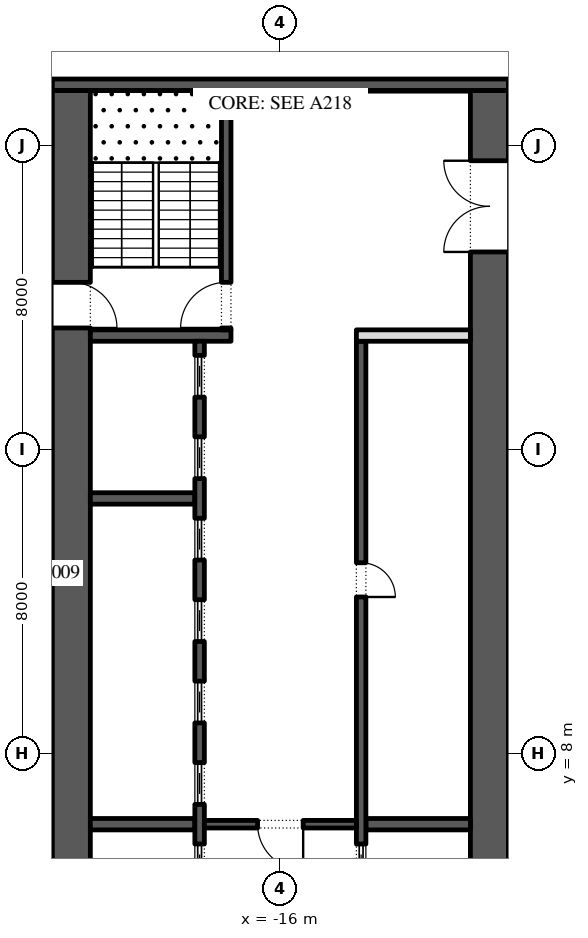
"""IFC4 building model, lengths in metres.
Left out: names, types, materials, properties, quantities, classifications, styles, units other than length and angle.
Written with IfcOpenShell. Run it as: python <this file> out.ifc"""

import sys

from ifc_helpers import new_model, si_unit, direction, frame, frame_2d, origin, place, context, subcontext, project, spatial, rectangle, extrude, element, fill, save


model = new_model("IFC4")
c1 = context("Model", 3, precision=1e-05, world=origin(), true_north=direction((0.0, 1.0)))
c2 = subcontext(c1, "Body", "Model", "MODEL_VIEW")
j1 = project(units=[si_unit("LENGTHUNIT", "METRE"), si_unit("PLANEANGLEUNIT", "RADIAN")], contexts=[c1])
p1 = place(None, origin())
s1 = spatial("IfcSite", under=j1, at=p1, CompositionType="ELEMENT")
p2 = place(p1, origin())
s2 = spatial("IfcBuilding", under=s1, at=p2, CompositionType="ELEMENT")
p3 = place(p2, frame((0.0, 0.0, 73.2)))
s3 = spatial("IfcBuildingStorey", under=s2, at=p3, CompositionType="ELEMENT", Elevation=73.2)
p4 = place(p3, frame((-21.5, -2.45, 0.0), z_axis=(0.0, 0.0, 1.0), x_axis=(0.0, 1.0, 0.0)))
e1 = element("IfcWall", 1, at=p4, inside=s3, PredefinedType="SHEAR", context=c2, shape_type="SweptSolid", body=[
    extrude(rectangle(XDim=27.9, YDim=1.0, at=frame_2d((13.95, 0.0))), origin(), (0.0, 0.0, 1.0), 4.0),
])
p5 = place(p4, frame((5.05, 0.0, 0.0)))
e2 = element("IfcOpeningElement", 2, at=p5, cuts=e1, PredefinedType="OPENING", context=c2, shape_type="SweptSolid", body=[
    extrude(rectangle(XDim=1.2, YDim=2.1, at=frame_2d((0.6, 1.05))), frame((0.0, 0.51, 0.0), z_axis=(0.0, -1.0, 0.0), x_axis=(1.0, 0.0, 0.0)), (0.0, 0.0, 1.0), 1.02),
])
p6 = place(p4, frame((21.65, 0.0, 0.0)))
e3 = element("IfcOpeningElement", 3, at=p6, cuts=e1, PredefinedType="OPENING", context=c2, shape_type="SweptSolid", body=[
    extrude(rectangle(XDim=1.2, YDim=2.1, at=frame_2d((0.6, 1.05))), frame((0.0, 0.51, 0.0), z_axis=(0.0, -1.0, 0.0), x_axis=(1.0, 0.0, 0.0)), (0.0, 0.0, 1.0), 1.02),
])
p7 = place(p3, frame((-10.5, -2.45, 0.0), z_axis=(0.0, 0.0, 1.0), x_axis=(0.0, 1.0, 0.0)))
e4 = element("IfcWall", 4, at=p7, inside=s3, PredefinedType="SHEAR", context=c2, shape_type="SweptSolid", body=[
    extrude(rectangle(XDim=27.9, YDim=1.0, at=frame_2d((13.95, 0.0))), origin(), (0.0, 0.0, 1.0), 4.0),
])
p8 = place(p7, frame((23.65, 0.0, 0.0)))
e5 = element("IfcOpeningElement", 5, at=p8, cuts=e4, PredefinedType="OPENING", context=c2, shape_type="SweptSolid", body=[
    extrude(rectangle(XDim=2.4, YDim=2.1, at=frame_2d((1.2, 1.05))), frame((0.0, 0.51, 0.0), z_axis=(0.0, -1.0, 0.0), x_axis=(1.0, 0.0, 0.0)), (0.0, 0.0, 1.0), 1.02),
])
p9 = place(p7, frame((1.087, 0.0, 0.0)))
e6 = element("IfcOpeningElement", 6, at=p9, cuts=e4, PredefinedType="OPENING", context=c2, shape_type="SweptSolid", body=[
    extrude(rectangle(XDim=0.9, YDim=2.1, at=frame_2d((0.45, 1.05))), frame((0.0, 0.51, 0.0), z_axis=(0.0, -1.0, 0.0), x_axis=(1.0, 0.0, 0.0)), (0.0, 0.0, 1.0), 1.02),
])
p10 = place(p7, frame((4.312, 0.0, 0.0)))
e7 = element("IfcOpeningElement", 7, at=p10, cuts=e4, PredefinedType="OPENING", context=c2, shape_type="SweptSolid", body=[
    extrude(rectangle(XDim=0.9, YDim=2.1, at=frame_2d((0.45, 1.05))), frame((0.0, 0.51, 0.0), z_axis=(0.0, -1.0, 0.0), x_axis=(1.0, 0.0, 0.0)), (0.0, 0.0, 1.0), 1.02),
])
p11 = place(p3, frame((-22.0, 25.6, 0.0), z_axis=(0.0, 0.0, 1.0), x_axis=(1.0, 0.0, 0.0)))
e8 = element("IfcWall", 8, at=p11, inside=s3, PredefinedType="SHEAR", context=c2, shape_type="SweptSolid", body=[
    extrude(rectangle(XDim=12.0, YDim=0.3, at=frame_2d((6.0, 0.0))), origin(), (0.0, 0.0, 1.0), 4.0),
])
p12 = place(p3, frame((-21.0, 19.0, 0.0), z_axis=(0.0, 0.0, 1.0), x_axis=(1.0, 0.0, 0.0)))
e9 = element("IfcWall", 9, at=p12, inside=s3, PredefinedType="SHEAR", context=c2, shape_type="SweptSolid", body=[
    extrude(rectangle(XDim=3.7, YDim=0.3, at=frame_2d((1.85, 0.0))), origin(), (0.0, 0.0, 1.0), 4.0),
])
p13 = place(p3, frame((-17.425, 19.15, 0.0), z_axis=(0.0, 0.0, 1.0), x_axis=(0.0, 1.0, 0.0)))
e10 = element("IfcWall", 10, at=p13, inside=s3, PredefinedType="SHEAR", context=c2, shape_type="SweptSolid", body=[
    extrude(rectangle(XDim=6.3, YDim=0.25, at=frame_2d((3.15, 0.0))), origin(), (0.0, 0.0, 1.0), 4.0),
])
p14 = place(p13, frame((0.05, 0.0, 0.0)))
e11 = element("IfcOpeningElement", 11, at=p14, cuts=e10, PredefinedType="OPENING", context=c2, shape_type="SweptSolid", body=[
    extrude(rectangle(XDim=1.2, YDim=2.1, at=frame_2d((0.6, 1.05))), frame((0.0, 0.135, 0.0), z_axis=(0.0, -1.0, 0.0), x_axis=(1.0, 0.0, 0.0)), (0.0, 0.0, 1.0), 0.27),
])
for number, where, z_axis, x_axis in (
    (12, (-21.0, 6.143, 0.0), (0.0, 0.0, 1.0), (1.0, 0.0, 0.0)),
    (13, (-21.0, 14.714, 0.0), (0.0, 0.0, 1.0), (1.0, 0.0, 0.0)),
):
    element("IfcWall", number, at=place(p3, frame(where, z_axis=z_axis, x_axis=x_axis)), inside=s3, PredefinedType="SHEAR", context=c2, shape_type="SweptSolid", body=[
        extrude(rectangle(XDim=2.75, YDim=0.3, at=frame_2d((1.375, 0.0))), origin(), (0.0, 0.0, 1.0), 4.0),
    ])
p15 = place(p3, frame((-18.125, 4.15, 0.0), z_axis=(0.0, 0.0, 1.0), x_axis=(0.0, 1.0, 0.0)))
e14 = element("IfcWall", 14, at=p15, inside=s3, PredefinedType="SHEAR", context=c2, shape_type="SweptSolid", body=[
    extrude(rectangle(XDim=14.7, YDim=0.25, at=frame_2d((7.35, 0.0))), origin(), (0.0, 0.0, 1.0), 4.0),
])
p16 = place(p15, frame((0.371, 0.0, 0.0)))
e15 = element("IfcOpeningElement", 15, at=p16, cuts=e14, PredefinedType="OPENING", context=c2, shape_type="SweptSolid", body=[
    extrude(rectangle(XDim=1.1, YDim=2.1, at=frame_2d((0.55, 1.05))), frame((0.0, 0.135, 0.0), z_axis=(0.0, -1.0, 0.0), x_axis=(1.0, 0.0, 0.0)), (0.0, 0.0, 1.0), 0.27),
])
p17 = place(p15, frame((2.514, 0.0, 0.0)))
e16 = element("IfcOpeningElement", 16, at=p17, cuts=e14, PredefinedType="OPENING", context=c2, shape_type="SweptSolid", body=[
    extrude(rectangle(XDim=1.1, YDim=2.1, at=frame_2d((0.55, 1.05))), frame((0.0, 0.135, 0.0), z_axis=(0.0, -1.0, 0.0), x_axis=(1.0, 0.0, 0.0)), (0.0, 0.0, 1.0), 0.27),
])
p18 = place(p15, frame((4.657, 0.0, 0.0)))
e17 = element("IfcOpeningElement", 17, at=p18, cuts=e14, PredefinedType="OPENING", context=c2, shape_type="SweptSolid", body=[
    extrude(rectangle(XDim=1.1, YDim=2.1, at=frame_2d((0.55, 1.05))), frame((0.0, 0.135, 0.0), z_axis=(0.0, -1.0, 0.0), x_axis=(1.0, 0.0, 0.0)), (0.0, 0.0, 1.0), 0.27),
])
p19 = place(p15, frame((6.8, 0.0, 0.0)))
e18 = element("IfcOpeningElement", 18, at=p19, cuts=e14, PredefinedType="OPENING", context=c2, shape_type="SweptSolid", body=[
    extrude(rectangle(XDim=1.1, YDim=2.1, at=frame_2d((0.55, 1.05))), frame((0.0, 0.135, 0.0), z_axis=(0.0, -1.0, 0.0), x_axis=(1.0, 0.0, 0.0)), (0.0, 0.0, 1.0), 0.27),
])
p20 = place(p15, frame((8.943, 0.0, 0.0)))
e19 = element("IfcOpeningElement", 19, at=p20, cuts=e14, PredefinedType="OPENING", context=c2, shape_type="SweptSolid", body=[
    extrude(rectangle(XDim=1.1, YDim=2.1, at=frame_2d((0.55, 1.05))), frame((0.0, 0.135, 0.0), z_axis=(0.0, -1.0, 0.0), x_axis=(1.0, 0.0, 0.0)), (0.0, 0.0, 1.0), 0.27),
])
p21 = place(p15, frame((11.086, 0.0, 0.0)))
e20 = element("IfcOpeningElement", 20, at=p21, cuts=e14, PredefinedType="OPENING", context=c2, shape_type="SweptSolid", body=[
    extrude(rectangle(XDim=1.1, YDim=2.1, at=frame_2d((0.55, 1.05))), frame((0.0, 0.135, 0.0), z_axis=(0.0, -1.0, 0.0), x_axis=(1.0, 0.0, 0.0)), (0.0, 0.0, 1.0), 0.27),
])
p22 = place(p15, frame((13.229, 0.0, 0.0)))
e21 = element("IfcOpeningElement", 21, at=p22, cuts=e14, PredefinedType="OPENING", context=c2, shape_type="SweptSolid", body=[
    extrude(rectangle(XDim=1.1, YDim=2.1, at=frame_2d((0.55, 1.05))), frame((0.0, 0.135, 0.0), z_axis=(0.0, -1.0, 0.0), x_axis=(1.0, 0.0, 0.0)), (0.0, 0.0, 1.0), 0.27),
])
p23 = place(p3, frame((-13.75, 6.143, 0.0), z_axis=(0.0, 0.0, 1.0), x_axis=(1.0, 0.0, 0.0)))
e22 = element("IfcWall", 22, at=p23, inside=s3, PredefinedType="SHEAR", context=c2, shape_type="SweptSolid", body=[
    extrude(rectangle(XDim=2.75, YDim=0.3, at=frame_2d((1.375, 0.0))), origin(), (0.0, 0.0, 1.0), 4.0),
])
p24 = place(p3, frame((-13.875, -2.45, 0.0), z_axis=(0.0, 0.0, 1.0), x_axis=(0.0, 1.0, 0.0)))
e23 = element("IfcWall", 23, at=p24, inside=s3, PredefinedType="SHEAR", context=c2, shape_type="SweptSolid", body=[
    extrude(rectangle(XDim=21.3, YDim=0.25, at=frame_2d((10.65, 0.0))), origin(), (0.0, 0.0, 1.0), 4.0),
])
p25 = place(p24, frame((14.571, 0.0, 0.0)))
e24 = element("IfcOpeningElement", 24, at=p25, cuts=e23, PredefinedType="OPENING", context=c2, shape_type="SweptSolid", body=[
    extrude(rectangle(XDim=0.9, YDim=2.1, at=frame_2d((0.45, 1.05))), frame((0.0, 0.135, 0.0), z_axis=(0.0, -1.0, 0.0), x_axis=(1.0, 0.0, 0.0)), (0.0, 0.0, 1.0), 0.27),
])
p26 = place(p24, frame((6.971, 0.0, 0.0)))
e25 = element("IfcOpeningElement", 25, at=p26, cuts=e23, PredefinedType="OPENING", context=c2, shape_type="SweptSolid", body=[
    extrude(rectangle(XDim=1.1, YDim=2.1, at=frame_2d((0.55, 1.05))), frame((0.0, 0.135, 0.0), z_axis=(0.0, -1.0, 0.0), x_axis=(1.0, 0.0, 0.0)), (0.0, 0.0, 1.0), 0.27),
])
p27 = place(p3, frame((-14.0, 19.0, 0.0), z_axis=(0.0, 0.0, 1.0), x_axis=(1.0, 0.0, 0.0)))
e26 = element("IfcWall", 26, at=p27, inside=s3, PredefinedType="PARTITIONING", context=c2, shape_type="SweptSolid", body=[
    extrude(rectangle(XDim=3.0, YDim=0.3, at=frame_2d((1.5, 0.0))), origin(), (0.0, 0.0, 1.0), 4.0),
])
p28 = place(p3, frame((-18.0, 6.143, 0.0), z_axis=(0.0, 0.0, 1.0), x_axis=(1.0, 0.0, 0.0)))
e27 = element("IfcWall", 27, at=p28, inside=s3, PredefinedType="SHEAR", context=c2, shape_type="SweptSolid", body=[
    extrude(rectangle(XDim=4.0, YDim=0.2, at=frame_2d((2.0, 0.0))), origin(), (0.0, 0.0, 1.0), 4.0),
])
p29 = place(p28, frame((1.4, 0.0, 0.0)))
e28 = element("IfcOpeningElement", 28, at=p29, cuts=e27, PredefinedType="OPENING", context=c2, shape_type="SweptSolid", body=[
    extrude(rectangle(XDim=1.2, YDim=2.1, at=frame_2d((0.6, 1.05))), frame((0.0, 0.11, 0.0), z_axis=(0.0, -1.0, 0.0), x_axis=(1.0, 0.0, 0.0)), (0.0, 0.0, 1.0), 0.22),
])
p30 = place(p16, origin())
e29 = element("IfcDoor", 29, at=p30, inside=s3, OperationType="SLIDING_TO_LEFT", PredefinedType="DOOR", context=c2, shape_type="SweptSolid", body=[
    extrude(rectangle(XDim=1.1, YDim=2.1, at=frame_2d((0.55, 1.05))), frame((0.0, 0.025, 0.0), z_axis=(0.0, -1.0, 0.0), x_axis=(1.0, 0.0, 0.0)), (0.0, 0.0, 1.0), 0.05),
])
fill(e15, e29)
p31 = place(p17, origin())
e30 = element("IfcDoor", 30, at=p31, inside=s3, OperationType="SLIDING_TO_LEFT", PredefinedType="DOOR", context=c2, shape_type="SweptSolid", body=[
    extrude(rectangle(XDim=1.1, YDim=2.1, at=frame_2d((0.55, 1.05))), frame((0.0, 0.025, 0.0), z_axis=(0.0, -1.0, 0.0), x_axis=(1.0, 0.0, 0.0)), (0.0, 0.0, 1.0), 0.05),
])
fill(e16, e30)
p32 = place(p18, origin())
e31 = element("IfcDoor", 31, at=p32, inside=s3, OperationType="SLIDING_TO_LEFT", PredefinedType="DOOR", context=c2, shape_type="SweptSolid", body=[
    extrude(rectangle(XDim=1.1, YDim=2.1, at=frame_2d((0.55, 1.05))), frame((0.0, 0.025, 0.0), z_axis=(0.0, -1.0, 0.0), x_axis=(1.0, 0.0, 0.0)), (0.0, 0.0, 1.0), 0.05),
])
fill(e17, e31)
p33 = place(p19, origin())
e32 = element("IfcDoor", 32, at=p33, inside=s3, OperationType="SLIDING_TO_LEFT", PredefinedType="DOOR", context=c2, shape_type="SweptSolid", body=[
    extrude(rectangle(XDim=1.1, YDim=2.1, at=frame_2d((0.55, 1.05))), frame((0.0, 0.025, 0.0), z_axis=(0.0, -1.0, 0.0), x_axis=(1.0, 0.0, 0.0)), (0.0, 0.0, 1.0), 0.05),
])
fill(e18, e32)
p34 = place(p20, origin())
e33 = element("IfcDoor", 33, at=p34, inside=s3, OperationType="SLIDING_TO_LEFT", PredefinedType="DOOR", context=c2, shape_type="SweptSolid", body=[
    extrude(rectangle(XDim=1.1, YDim=2.1, at=frame_2d((0.55, 1.05))), frame((0.0, 0.025, 0.0), z_axis=(0.0, -1.0, 0.0), x_axis=(1.0, 0.0, 0.0)), (0.0, 0.0, 1.0), 0.05),
])
fill(e19, e33)
p35 = place(p21, origin())
e34 = element("IfcDoor", 34, at=p35, inside=s3, OperationType="SLIDING_TO_LEFT", PredefinedType="DOOR", context=c2, shape_type="SweptSolid", body=[
    extrude(rectangle(XDim=1.1, YDim=2.1, at=frame_2d((0.55, 1.05))), frame((0.0, 0.025, 0.0), z_axis=(0.0, -1.0, 0.0), x_axis=(1.0, 0.0, 0.0)), (0.0, 0.0, 1.0), 0.05),
])
fill(e20, e34)
p36 = place(p22, origin())
e35 = element("IfcDoor", 35, at=p36, inside=s3, OperationType="SLIDING_TO_LEFT", PredefinedType="DOOR", context=c2, shape_type="SweptSolid", body=[
    extrude(rectangle(XDim=1.1, YDim=2.1, at=frame_2d((0.55, 1.05))), frame((0.0, 0.025, 0.0), z_axis=(0.0, -1.0, 0.0), x_axis=(1.0, 0.0, 0.0)), (0.0, 0.0, 1.0), 0.05),
])
fill(e21, e35)
p37 = place(p25, frame((0.9, -0.2, 0.0), z_axis=(0.0, 0.0, 1.0), x_axis=(-1.0, 0.0, 0.0)))
e36 = element("IfcDoor", 36, at=p37, inside=s3, OperationType="SINGLE_SWING_LEFT", PredefinedType="DOOR", context=c2, shape_type="SweptSolid", body=[
    extrude(rectangle(XDim=0.9, YDim=2.1, at=frame_2d((0.45, 1.05))), frame((0.0, -0.075, 0.0), z_axis=(0.0, -1.0, 0.0), x_axis=(1.0, 0.0, 0.0)), (0.0, 0.0, 1.0), 0.05),
])
fill(e24, e36)
p38 = place(p26, origin())
e37 = element("IfcDoor", 37, at=p38, inside=s3, OperationType="SLIDING_TO_LEFT", PredefinedType="DOOR", context=c2, shape_type="SweptSolid", body=[
    extrude(rectangle(XDim=1.1, YDim=2.1, at=frame_2d((0.55, 1.05))), frame((0.0, 0.025, 0.0), z_axis=(0.0, -1.0, 0.0), x_axis=(1.0, 0.0, 0.0)), (0.0, 0.0, 1.0), 0.05),
])
fill(e25, e37)
p39 = place(p29, frame((1.2, 0.0, 0.0), z_axis=(0.0, 0.0, 1.0), x_axis=(-1.0, 0.0, 0.0)))
e38 = element("IfcDoor", 38, at=p39, inside=s3, OperationType="SINGLE_SWING_RIGHT", PredefinedType="DOOR", context=c2, shape_type="SweptSolid", body=[
    extrude(rectangle(XDim=1.2, YDim=2.1, at=frame_2d((0.6, 1.05))), frame((0.0, 0.025, 0.0), z_axis=(0.0, -1.0, 0.0), x_axis=(1.0, 0.0, 0.0)), (0.0, 0.0, 1.0), 0.05),
])
fill(e28, e38)
p40 = place(p8, origin())
e39 = element("IfcDoor", 39, at=p40, inside=s3, OperationType="DOUBLE_DOOR_SINGLE_SWING", PredefinedType="DOOR", context=c2, shape_type="SweptSolid", body=[
    extrude(rectangle(XDim=2.4, YDim=2.1, at=frame_2d((1.2, 1.05))), frame((0.0, 0.025, 0.0), z_axis=(0.0, -1.0, 0.0), x_axis=(1.0, 0.0, 0.0)), (0.0, 0.0, 1.0), 0.05),
])
fill(e5, e39)
p41 = place(p14, origin())
e40 = element("IfcDoor", 40, at=p41, inside=s3, OperationType="SINGLE_SWING_RIGHT", PredefinedType="DOOR", context=c2, shape_type="SweptSolid", body=[
    extrude(rectangle(XDim=1.2, YDim=2.1, at=frame_2d((0.6, 1.05))), frame((0.0, 0.025, 0.0), z_axis=(0.0, -1.0, 0.0), x_axis=(1.0, 0.0, 0.0)), (0.0, 0.0, 1.0), 0.05),
])
fill(e11, e40)
p42 = place(p6, frame((1.2, 0.0, 0.0), z_axis=(0.0, 0.0, 1.0), x_axis=(-1.0, 0.0, 0.0)))
e41 = element("IfcDoor", 41, at=p42, inside=s3, OperationType="SINGLE_SWING_LEFT", PredefinedType="DOOR", context=c2, shape_type="SweptSolid", body=[
    extrude(rectangle(XDim=1.2, YDim=2.1, at=frame_2d((0.6, 1.05))), frame((0.0, 0.025, 0.0), z_axis=(0.0, -1.0, 0.0), x_axis=(1.0, 0.0, 0.0)), (0.0, 0.0, 1.0), 0.05),
])
fill(e3, e41)
save(model, sys.argv[1])
